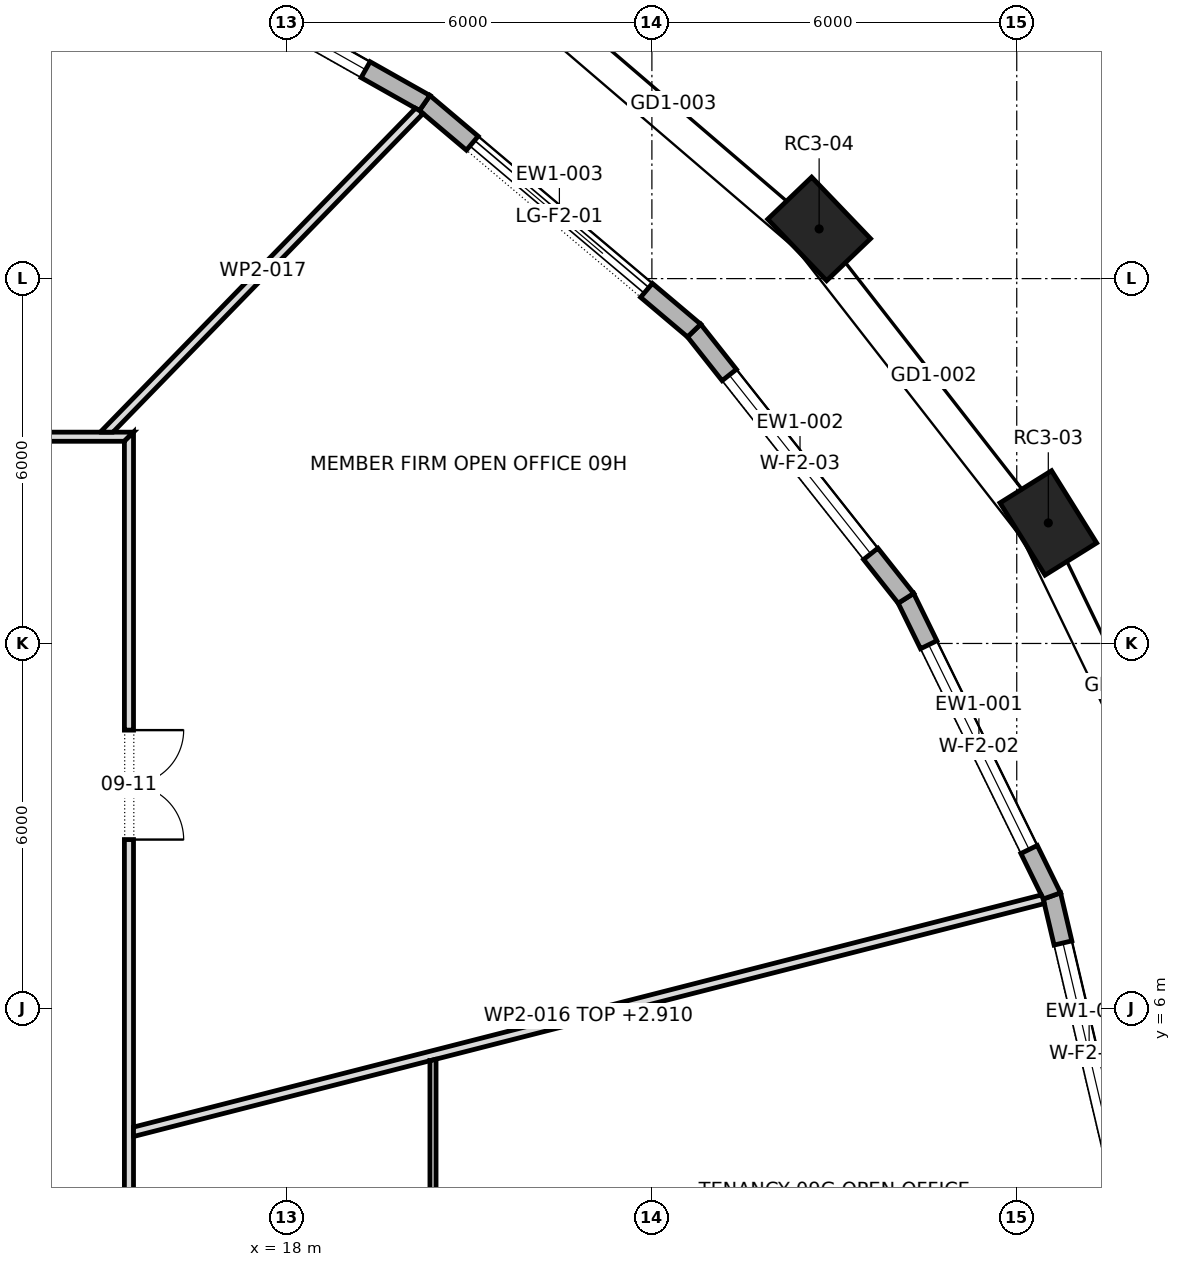
"""IFC4 building model, lengths in metres.
Left out: names, types, materials, properties, quantities, classifications, styles, units other than length and angle.
Written with IfcOpenShell. Run it as: python <this file> out.ifc"""

import sys

from ifc_helpers import new_model, si_unit, direction, frame, frame_2d, origin, origin_2d, place, context, subcontext, project, spatial, polyline, rectangle, outline, extrude, element, fill, save


model = new_model("IFC4")
c1 = context("Model", 3, precision=1e-05, world=origin(), true_north=direction((0.0, 1.0)))
c2 = subcontext(c1, "Body", "Model", "MODEL_VIEW")
j1 = project(units=[si_unit("LENGTHUNIT", "METRE"), si_unit("PLANEANGLEUNIT", "RADIAN")], contexts=[c1])
p1 = place(None, origin())
s1 = spatial("IfcSite", under=j1, at=p1, CompositionType="ELEMENT")
p2 = place(p1, origin())
s2 = spatial("IfcBuilding", under=s1, at=p2, CompositionType="ELEMENT")
p3 = place(p2, frame((0.0, 0.0, 129.7)))
s3 = spatial("IfcBuildingStorey", under=s2, at=p3, CompositionType="ELEMENT", Elevation=129.7)
for number, where, z_axis, x_axis in (
    (1, (30.519, 13.982, 0.0), (0.0, 0.0, 1.0), (-0.529, 0.849, 0.0)),
    (2, (26.75, 18.817, 0.0), (0.0, 0.0, 1.0), (-0.692, 0.722, 0.0)),
):
    element("IfcColumn", number, at=place(p3, frame(where, z_axis=z_axis, x_axis=x_axis)), inside=s3, PredefinedType="COLUMN", context=c2, shape_type="SweptSolid", body=[
        extrude(rectangle(XDim=1.4, YDim=1.0, at=origin_2d()), origin(), (0.0, 0.0, 1.0), 4.2),
    ])
p4 = place(p3, frame((31.802, 2.65, 0.0), z_axis=(0.0, 0.0, 1.0), x_axis=(-0.229227895667, 0.973372781543, 0.0)))
e3 = element("IfcWall", 3, at=p4, inside=s3, PredefinedType="STANDARD", context=c2, shape_type="SweptSolid", body=[
    extrude(outline(polyline([(-0.017, -0.15), (5.357, -0.15), (5.323, 0.15), (0.017, 0.15), (-0.017, -0.15)])), origin(), (0.0, 0.0, 1.0), 3.9),
])
p5 = place(p4, frame((0.795, 0.0, 0.6)))
e4 = element("IfcOpeningElement", 4, at=p5, cuts=e3, PredefinedType="OPENING", context=c2, shape_type="SweptSolid", body=[
    extrude(rectangle(XDim=3.75, YDim=2.85, at=frame_2d((1.875, 1.425))), frame((0.0, 0.162, 0.0), z_axis=(0.0, -1.0, 0.0), x_axis=(1.0, 0.0, 0.0)), (0.0, 0.0, 1.0), 0.324),
])
p6 = place(p3, frame((30.578, 7.848, 0.0), z_axis=(0.0, 0.0, 1.0), x_axis=(-0.440321465864, 0.897840189956, 0.0)))
e5 = element("IfcWall", 5, at=p6, inside=s3, PredefinedType="STANDARD", context=c2, shape_type="SweptSolid", body=[
    extrude(outline(polyline([(-0.017, -0.15), (5.468, -0.15), (5.435, 0.15), (0.017, 0.15), (-0.017, -0.15)])), origin(), (0.0, 0.0, 1.0), 3.9),
])
p7 = place(p6, frame((0.851, 0.0, 0.6)))
e6 = element("IfcOpeningElement", 6, at=p7, cuts=e5, PredefinedType="OPENING", context=c2, shape_type="SweptSolid", body=[
    extrude(rectangle(XDim=3.75, YDim=2.85, at=frame_2d((1.875, 1.425))), frame((0.0, 0.162, 0.0), z_axis=(0.0, -1.0, 0.0), x_axis=(1.0, 0.0, 0.0)), (0.0, 0.0, 1.0), 0.324),
])
p8 = place(p3, frame((28.177, 12.743, 0.0), z_axis=(0.0, 0.0, 1.0), x_axis=(-0.620464552431, 0.784234492468, 0.0)))
e7 = element("IfcWall", 7, at=p8, inside=s3, PredefinedType="STANDARD", context=c2, shape_type="SweptSolid", body=[
    extrude(outline(polyline([(-0.016, -0.15), (5.629, -0.15), (5.599, 0.15), (0.016, 0.15), (-0.016, -0.15)])), origin(), (0.0, 0.0, 1.0), 3.9),
])
p9 = place(p8, frame((0.932, 0.0, 0.6)))
e8 = element("IfcOpeningElement", 8, at=p9, cuts=e7, PredefinedType="OPENING", context=c2, shape_type="SweptSolid", body=[
    extrude(rectangle(XDim=3.75, YDim=2.85, at=frame_2d((1.875, 1.425))), frame((0.0, 0.162, 0.0), z_axis=(0.0, -1.0, 0.0), x_axis=(1.0, 0.0, 0.0)), (0.0, 0.0, 1.0), 0.324),
])
p10 = place(p3, frame((24.694, 17.146, 0.0), z_axis=(0.0, 0.0, 1.0), x_axis=(-0.763963973896, 0.645258898884, 0.0)))
e9 = element("IfcWall", 9, at=p10, inside=s3, PredefinedType="STANDARD", context=c2, shape_type="SweptSolid", body=[
    extrude(outline(polyline([(-0.015, -0.15), (5.814, -0.15), (5.786, 0.15), (0.015, 0.15), (-0.015, -0.15)])), origin(), (0.0, 0.0, 1.0), 3.9),
])
p11 = place(p10, frame((1.025, 0.0, 0.0)))
e10 = element("IfcOpeningElement", 10, at=p11, cuts=e9, PredefinedType="OPENING", context=c2, shape_type="SweptSolid", body=[
    extrude(rectangle(XDim=3.75, YDim=3.45, at=frame_2d((1.875, 1.725))), frame((0.0, 0.162, 0.0), z_axis=(0.0, -1.0, 0.0), x_axis=(1.0, 0.0, 0.0)), (0.0, 0.0, 1.0), 0.324),
])
p12 = place(p3, frame((20.263, 20.888, 0.0), z_axis=(0.0, 0.0, 1.0), x_axis=(-0.87090857883, 0.491445060327, 0.0)))
e11 = element("IfcWall", 11, at=p12, inside=s3, PredefinedType="STANDARD", context=c2, shape_type="SweptSolid", body=[
    extrude(outline(polyline([(-0.014, -0.15), (5.994, -0.15), (5.967, 0.15), (0.014, 0.15), (-0.014, -0.15)])), origin(), (0.0, 0.0, 1.0), 3.9),
])
p13 = place(p12, frame((1.115, 0.0, 0.6)))
e12 = element("IfcOpeningElement", 12, at=p13, cuts=e11, PredefinedType="OPENING", context=c2, shape_type="SweptSolid", body=[
    extrude(rectangle(XDim=3.75, YDim=2.85, at=frame_2d((1.875, 1.425))), frame((0.0, 0.162, 0.0), z_axis=(0.0, -1.0, 0.0), x_axis=(1.0, 0.0, 0.0)), (0.0, 0.0, 1.0), 0.324),
])
p14 = place(p3, frame((-15.475, 15.4, 0.0), z_axis=(0.0, 0.0, 1.0), x_axis=(1.0, 0.0, 0.0)))
e13 = element("IfcWall", 13, at=p14, inside=s3, PredefinedType="PARTITIONING", context=c2, shape_type="SweptSolid", body=[
    extrude(outline(polyline([(0.15, -0.075), (2.066, -0.075), (3.981, -0.075), (5.897, -0.075), (7.812, -0.075), (9.728, -0.075), (11.644, -0.075), (13.56, -0.075), (15.475, -0.075), (17.391, -0.075), (19.306, -0.075), (21.222, -0.075), (23.138, -0.075), (25.053, -0.075), (26.969, -0.075), (28.885, -0.075), (30.8, -0.075), (30.95, 0.075), (29.016, 0.075), (27.081, 0.075), (25.147, 0.075), (23.212, 0.075), (21.278, 0.075), (19.344, 0.075), (17.409, 0.075), (15.475, 0.075), (13.541, 0.075), (11.606, 0.075), (9.672, 0.075), (7.738, 0.075), (5.803, 0.075), (3.869, 0.075), (1.935, 0.075), (0.0, 0.075), (0.15, -0.075)])), origin(), (0.0, 0.0, 1.0), 3.9),
])
p15 = place(p14, frame((22.955, 0.0, 0.0)))
e14 = element("IfcOpeningElement", 14, at=p15, cuts=e13, PredefinedType="OPENING", context=c2, shape_type="SweptSolid", body=[
    extrude(rectangle(XDim=1.8, YDim=2.1, at=frame_2d((0.9, 1.05))), frame((0.0, 0.087, 0.0), z_axis=(0.0, -1.0, 0.0), x_axis=(1.0, 0.0, 0.0)), (0.0, 0.0, 1.0), 0.174),
])
p16 = place(p14, frame((7.995, 0.0, 0.0)))
e15 = element("IfcOpeningElement", 15, at=p16, cuts=e13, PredefinedType="OPENING", context=c2, shape_type="SweptSolid", body=[
    extrude(rectangle(XDim=1.8, YDim=2.1, at=frame_2d((0.9, 1.05))), frame((0.0, 0.087, 0.0), z_axis=(0.0, -1.0, 0.0), x_axis=(1.0, 0.0, 0.0)), (0.0, 0.0, 1.0), 0.174),
])
p17 = place(p3, frame((15.4, -15.475, 0.0), z_axis=(0.0, 0.0, 1.0), x_axis=(0.0, 1.0, 0.0)))
e16 = element("IfcWall", 16, at=p17, inside=s3, PredefinedType="PARTITIONING", context=c2, shape_type="SweptSolid", body=[
    extrude(outline(polyline([(0.0, -0.075), (1.935, -0.075), (3.869, -0.075), (5.803, -0.075), (7.738, -0.075), (9.672, -0.075), (11.606, -0.075), (13.541, -0.075), (15.475, -0.075), (17.409, -0.075), (19.344, -0.075), (21.278, -0.075), (23.212, -0.075), (25.147, -0.075), (27.081, -0.075), (29.016, -0.075), (30.95, -0.075), (30.8, 0.075), (28.885, 0.075), (26.969, 0.075), (25.053, 0.075), (23.138, 0.075), (21.222, 0.075), (19.306, 0.075), (17.391, 0.075), (15.475, 0.075), (13.56, 0.075), (11.644, 0.075), (9.728, 0.075), (7.812, 0.075), (5.897, 0.075), (3.981, 0.075), (2.066, 0.075), (0.15, 0.075), (0.0, -0.075)])), origin(), (0.0, 0.0, 1.0), 3.9),
])
p18 = place(p17, frame((9.76, 0.0, 0.0)))
e17 = element("IfcOpeningElement", 17, at=p18, cuts=e16, PredefinedType="OPENING", context=c2, shape_type="SweptSolid", body=[
    extrude(rectangle(XDim=1.0, YDim=2.1, at=frame_2d((0.5, 1.05))), frame((0.0, 0.087, 0.0), z_axis=(0.0, -1.0, 0.0), x_axis=(1.0, 0.0, 0.0)), (0.0, 0.0, 1.0), 0.174),
])
p19 = place(p17, frame((15.21, 0.0, 0.0)))
e18 = element("IfcOpeningElement", 18, at=p19, cuts=e16, PredefinedType="OPENING", context=c2, shape_type="SweptSolid", body=[
    extrude(rectangle(XDim=1.0, YDim=2.1, at=frame_2d((0.5, 1.05))), frame((0.0, 0.087, 0.0), z_axis=(0.0, -1.0, 0.0), x_axis=(1.0, 0.0, 0.0)), (0.0, 0.0, 1.0), 0.174),
])
p20 = place(p17, frame((24.25, 0.0, 0.0)))
e19 = element("IfcOpeningElement", 19, at=p20, cuts=e16, PredefinedType="OPENING", context=c2, shape_type="SweptSolid", body=[
    extrude(rectangle(XDim=1.8, YDim=2.1, at=frame_2d((0.9, 1.05))), frame((0.0, 0.087, 0.0), z_axis=(0.0, -1.0, 0.0), x_axis=(1.0, 0.0, 0.0)), (0.0, 0.0, 1.0), 0.174),
])
p21 = place(p3, frame((15.457, 3.965, 0.0), z_axis=(0.0, 0.0, 1.0), x_axis=(0.968826155352, 0.247741560312, 0.0)))
e20 = element("IfcWall", 20, at=p21, inside=s3, PredefinedType="PARTITIONING", context=c2, shape_type="SweptSolid", body=[
    extrude(outline(polyline([(0.0, -0.075), (1.677, -0.075), (3.354, -0.075), (5.031, -0.075), (5.032, -0.073), (5.038, -0.075), (6.775, -0.075), (8.512, -0.075), (10.249, -0.075), (11.986, -0.075), (13.723, -0.075), (15.46, -0.075), (15.46, 0.01), (15.447, 0.075), (13.521, 0.075), (11.594, 0.075), (9.668, 0.075), (7.742, 0.075), (5.816, 0.075), (3.89, 0.075), (1.964, 0.075), (0.038, 0.075), (0.0, -0.073), (0.0, -0.075)])), origin(), (0.0, 0.0, 1.0), 2.91),
])
p22 = place(p3, frame((20.182, 20.767, 0.0), z_axis=(0.0, 0.0, 1.0), x_axis=(-0.697398145205, -0.716683910148, 0.0)))
e21 = element("IfcWall", 21, at=p22, inside=s3, PredefinedType="PARTITIONING", context=c2, shape_type="SweptSolid", body=[
    extrude(outline(polyline([(7.456, -0.075), (7.456, -0.075), (7.363, 0.021), (7.363, 0.021), (7.311, 0.075), (5.483, 0.075), (3.655, 0.075), (1.828, 0.075), (0.0, 0.075), (0.0, 0.073), (0.005, -0.002), (0.024, -0.075), (1.882, -0.075), (3.74, -0.075), (5.598, -0.075), (7.456, -0.075)])), origin(), (0.0, 0.0, 1.0), 3.9),
])
p23 = place(p3, frame((20.4, -9.148, 0.0), z_axis=(0.0, 0.0, 1.0), x_axis=(0.0, 1.0, 0.0)))
e22 = element("IfcWall", 22, at=p23, inside=s3, PredefinedType="PARTITIONING", context=c2, shape_type="SweptSolid", body=[
    extrude(outline(polyline([(0.0, -0.05), (1.927, -0.05), (3.854, -0.05), (3.854, -0.048), (3.861, -0.05), (5.603, -0.05), (7.345, -0.05), (9.087, -0.05), (10.828, -0.05), (12.57, -0.05), (14.312, -0.05), (14.312, -0.049), (14.287, 0.05), (12.573, 0.05), (10.859, 0.05), (9.146, 0.05), (7.432, 0.05), (5.719, 0.05), (5.719, 0.05), (5.618, 0.05), (5.618, 0.05), (3.761, 0.05), (1.903, 0.05), (0.045, 0.05), (0.0, -0.05), (0.0, -0.05)])), origin(), (0.0, 0.0, 1.0), 3.9),
])
p24 = place(p23, frame((10.463, 0.0, 0.0)))
e23 = element("IfcOpeningElement", 23, at=p24, cuts=e22, PredefinedType="OPENING", context=c2, shape_type="SweptSolid", body=[
    extrude(rectangle(XDim=0.9, YDim=2.1, at=frame_2d((0.45, 1.05))), frame((0.0, 0.062, 0.0), z_axis=(0.0, -1.0, 0.0), x_axis=(1.0, 0.0, 0.0)), (0.0, 0.0, 1.0), 0.124),
])
p25 = place(p5, origin())
e24 = element("IfcWindow", 24, at=p25, inside=s3, PartitioningType="TRIPLE_PANEL_VERTICAL", PredefinedType="WINDOW", context=c2, shape_type="SweptSolid", body=[
    extrude(rectangle(XDim=3.75, YDim=2.85, at=frame_2d((1.875, 1.425))), frame((0.0, 0.03, 0.0), z_axis=(0.0, -1.0, 0.0), x_axis=(1.0, 0.0, 0.0)), (0.0, 0.0, 1.0), 0.06),
])
fill(e4, e24)
p26 = place(p7, origin())
e25 = element("IfcWindow", 25, at=p26, inside=s3, PartitioningType="TRIPLE_PANEL_VERTICAL", PredefinedType="WINDOW", context=c2, shape_type="SweptSolid", body=[
    extrude(rectangle(XDim=3.75, YDim=2.85, at=frame_2d((1.875, 1.425))), frame((0.0, 0.03, 0.0), z_axis=(0.0, -1.0, 0.0), x_axis=(1.0, 0.0, 0.0)), (0.0, 0.0, 1.0), 0.06),
])
fill(e6, e25)
p27 = place(p9, origin())
e26 = element("IfcWindow", 26, at=p27, inside=s3, PartitioningType="TRIPLE_PANEL_VERTICAL", PredefinedType="WINDOW", context=c2, shape_type="SweptSolid", body=[
    extrude(rectangle(XDim=3.75, YDim=2.85, at=frame_2d((1.875, 1.425))), frame((0.0, 0.03, 0.0), z_axis=(0.0, -1.0, 0.0), x_axis=(1.0, 0.0, 0.0)), (0.0, 0.0, 1.0), 0.06),
])
fill(e8, e26)
p28 = place(p11, origin())
e27 = element("IfcDoor", 27, at=p28, inside=s3, OperationType="DOUBLE_DOOR_SLIDING", PredefinedType="DOOR", context=c2, shape_type="SweptSolid", body=[
    extrude(rectangle(XDim=3.75, YDim=3.45, at=frame_2d((1.875, 1.725))), frame((0.0, 0.025, 0.0), z_axis=(0.0, -1.0, 0.0), x_axis=(1.0, 0.0, 0.0)), (0.0, 0.0, 1.0), 0.05),
])
fill(e10, e27)
p29 = place(p13, origin())
e28 = element("IfcWindow", 28, at=p29, inside=s3, PartitioningType="TRIPLE_PANEL_VERTICAL", PredefinedType="WINDOW", context=c2, shape_type="SweptSolid", body=[
    extrude(rectangle(XDim=3.75, YDim=2.85, at=frame_2d((1.875, 1.425))), frame((0.0, 0.03, 0.0), z_axis=(0.0, -1.0, 0.0), x_axis=(1.0, 0.0, 0.0)), (0.0, 0.0, 1.0), 0.06),
])
fill(e12, e28)
p30 = place(p20, frame((1.8, 0.0, 0.0), z_axis=(0.0, 0.0, 1.0), x_axis=(-1.0, 0.0, 0.0)))
e29 = element("IfcDoor", 29, at=p30, inside=s3, OperationType="DOUBLE_DOOR_SINGLE_SWING", PredefinedType="DOOR", context=c2, shape_type="SweptSolid", body=[
    extrude(rectangle(XDim=1.8, YDim=2.1, at=frame_2d((0.9, 1.05))), frame((0.0, 0.025, 0.0), z_axis=(0.0, -1.0, 0.0), x_axis=(1.0, 0.0, 0.0)), (0.0, 0.0, 1.0), 0.05),
])
fill(e19, e29)
save(model, sys.argv[1])
